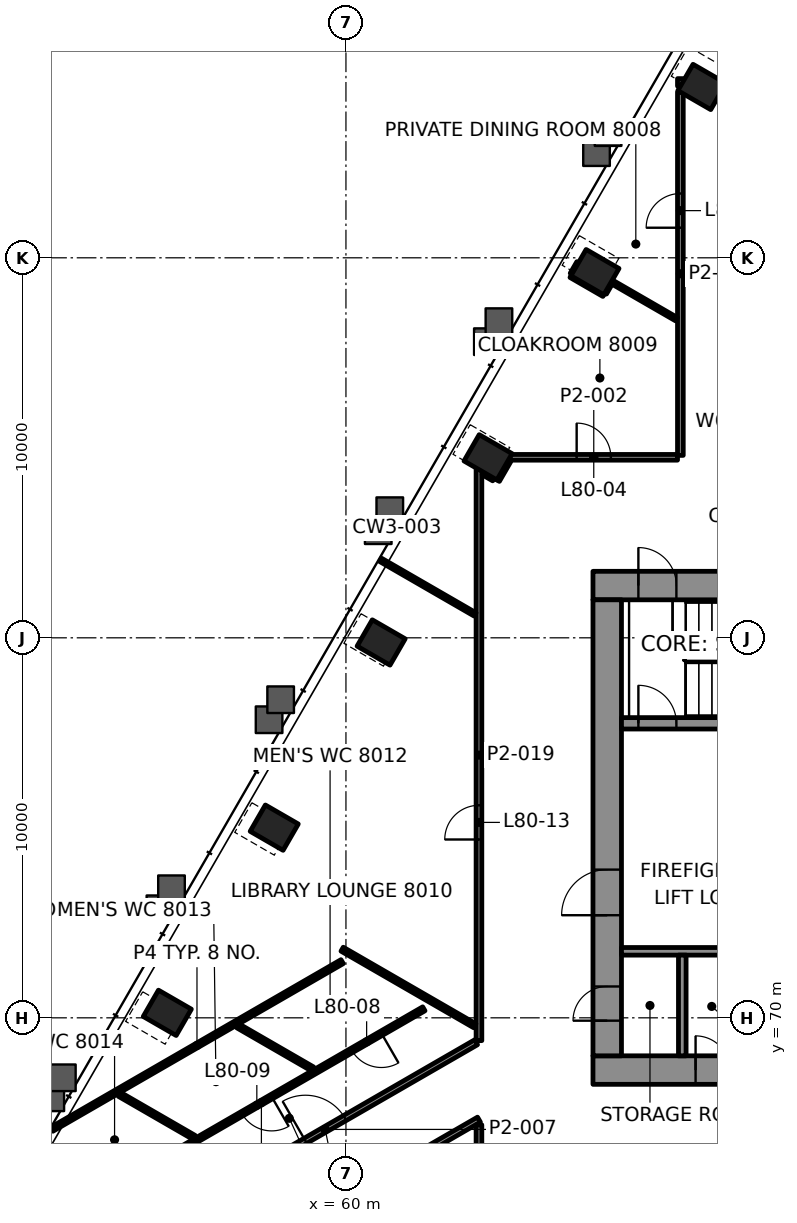
"""IFC4 building model, lengths in metres.
Left out: names, types, materials, properties, quantities, classifications, styles, units other than length and angle.
Written with IfcOpenShell. Run it as: python <this file> out.ifc"""

import sys

from ifc_helpers import new_model, si_unit, direction, frame, frame_2d, origin, origin_2d, place, context, subcontext, project, spatial, rectangle, hollow_rectangle, extrude, element, fill, save


model = new_model("IFC4")
c1 = context("Model", 3, precision=1e-05, world=origin(), true_north=direction((0.0, 1.0)))
c2 = subcontext(c1, "Body", "Model", "MODEL_VIEW")
j1 = project(units=[si_unit("LENGTHUNIT", "METRE"), si_unit("PLANEANGLEUNIT", "RADIAN")], contexts=[c1])
p1 = place(None, origin())
s1 = spatial("IfcSite", under=j1, at=p1, CompositionType="ELEMENT")
p2 = place(p1, origin())
s2 = spatial("IfcBuilding", under=s1, at=p2, CompositionType="ELEMENT")
p3 = place(p2, frame((0.0, 0.0, 326.6)))
s3 = spatial("IfcBuildingStorey", under=s2, at=p3, CompositionType="ELEMENT", Elevation=326.6)
for number, where, z_axis, x_axis in (
    (1, (69.366, 94.496, -0.0), (0.0, 0.0, 1.0), (-0.5, -0.866, 0.0)),
    (2, (66.553, 89.623, -0.0), (0.0, 0.0, 1.0), (-0.5, -0.866, 0.0)),
    (3, (63.74, 84.75, -0.0), (0.0, 0.0, 1.0), (-0.5, -0.866, 0.0)),
    (4, (60.926, 79.877, -0.0), (0.0, 0.0, 1.0), (-0.5, -0.866, 0.0)),
    (5, (58.113, 75.004, -0.0), (0.0, 0.0, 1.0), (-0.5, -0.866, 0.0)),
    (6, (55.299, 70.131, -0.0), (0.0, 0.0, 1.0), (-0.5, -0.866, 0.0)),
):
    element("IfcColumn", number, at=place(p3, frame(where, z_axis=z_axis, x_axis=x_axis)), inside=s3, PredefinedType="COLUMN", context=c2, shape_type="SweptSolid", body=[
        extrude(hollow_rectangle(XDim=0.8, YDim=1.0, WallThickness=0.05, at=origin_2d()), origin(), (0.0, 0.0, 1.0), 5.0),
    ])
p4 = place(p3, frame((66.5, 68.625, 0.0), z_axis=(0.0, 0.0, 1.0), x_axis=(1.0, 0.0, 0.0)))
e7 = element("IfcWall", 7, at=p4, inside=s3, PredefinedType="SHEAR", context=c2, shape_type="SweptSolid", body=[
    extrude(rectangle(XDim=17.0, YDim=0.75, at=frame_2d((8.5, 0.0))), origin(), (0.0, 0.0, 1.0), 4.7),
])
p5 = place(p4, frame((2.7, 0.0, 0.0)))
e8 = element("IfcOpeningElement", 8, at=p5, cuts=e7, PredefinedType="OPENING", context=c2, shape_type="SweptSolid", body=[
    extrude(rectangle(XDim=0.9, YDim=2.1, at=frame_2d((0.45, 1.05))), frame((0.0, 0.385, 0.0), z_axis=(0.0, -1.0, 0.0), x_axis=(1.0, 0.0, 0.0)), (0.0, 0.0, 1.0), 0.77),
])
p6 = place(p3, frame((66.5, 81.375, 0.0), z_axis=(0.0, 0.0, 1.0), x_axis=(1.0, 0.0, 0.0)))
e9 = element("IfcWall", 9, at=p6, inside=s3, PredefinedType="SHEAR", context=c2, shape_type="SweptSolid", body=[
    extrude(rectangle(XDim=17.0, YDim=0.75, at=frame_2d((8.5, 0.0))), origin(), (0.0, 0.0, 1.0), 4.7),
])
p7 = place(p6, frame((1.195, 0.0, 0.0)))
e10 = element("IfcOpeningElement", 10, at=p7, cuts=e9, PredefinedType="OPENING", context=c2, shape_type="SweptSolid", body=[
    extrude(rectangle(XDim=1.0, YDim=2.1, at=frame_2d((0.5, 1.05))), frame((0.0, 0.385, 0.0), z_axis=(0.0, -1.0, 0.0), x_axis=(1.0, 0.0, 0.0)), (0.0, 0.0, 1.0), 0.77),
])
p8 = place(p6, frame((15.005, 0.0, 0.0)))
e11 = element("IfcOpeningElement", 11, at=p8, cuts=e9, PredefinedType="OPENING", context=c2, shape_type="SweptSolid", body=[
    extrude(rectangle(XDim=1.0, YDim=2.1, at=frame_2d((0.5, 1.05))), frame((0.0, 0.385, 0.0), z_axis=(0.0, -1.0, 0.0), x_axis=(1.0, 0.0, 0.0)), (0.0, 0.0, 1.0), 0.77),
])
p9 = place(p6, frame((8.15, 0.0, 0.0)))
e12 = element("IfcOpeningElement", 12, at=p9, cuts=e9, PredefinedType="OPENING", context=c2, shape_type="SweptSolid", body=[
    extrude(rectangle(XDim=0.9, YDim=2.1, at=frame_2d((0.45, 1.05))), frame((0.0, 0.385, 0.0), z_axis=(0.0, -1.0, 0.0), x_axis=(1.0, 0.0, 0.0)), (0.0, 0.0, 1.0), 0.77),
])
p10 = place(p3, frame((66.875, 69.0, 0.0), z_axis=(0.0, 0.0, 1.0), x_axis=(0.0, 1.0, 0.0)))
e13 = element("IfcWall", 13, at=p10, inside=s3, PredefinedType="SHEAR", context=c2, shape_type="SweptSolid", body=[
    extrude(rectangle(XDim=12.0, YDim=0.75, at=frame_2d((6.0, 0.0))), origin(), (0.0, 0.0, 1.0), 4.7),
])
p11 = place(p10, frame((3.7, 0.0, 0.0)))
e14 = element("IfcOpeningElement", 14, at=p11, cuts=e13, PredefinedType="OPENING", context=c2, shape_type="SweptSolid", body=[
    extrude(rectangle(XDim=1.2, YDim=2.1, at=frame_2d((0.6, 1.05))), frame((0.0, 0.385, 0.0), z_axis=(0.0, -1.0, 0.0), x_axis=(1.0, 0.0, 0.0)), (0.0, 0.0, 1.0), 0.77),
])
p12 = place(p10, frame((0.925, 0.0, 0.0)))
e15 = element("IfcOpeningElement", 15, at=p12, cuts=e13, PredefinedType="OPENING", context=c2, shape_type="SweptSolid", body=[
    extrude(rectangle(XDim=0.9, YDim=2.1, at=frame_2d((0.45, 1.05))), frame((0.0, 0.385, 0.0), z_axis=(0.0, -1.0, 0.0), x_axis=(1.0, 0.0, 0.0)), (0.0, 0.0, 1.0), 0.77),
])
p13 = place(p3, frame((67.25, 77.75, 0.0), z_axis=(0.0, 0.0, 1.0), x_axis=(1.0, 0.0, 0.0)))
e16 = element("IfcWall", 16, at=p13, inside=s3, PredefinedType="SHEAR", context=c2, shape_type="SweptSolid", body=[
    extrude(rectangle(XDim=15.5, YDim=0.3, at=frame_2d((7.75, 0.0))), origin(), (0.0, 0.0, 1.0), 4.7),
])
p14 = place(p13, frame((0.445, 0.0, 0.0)))
e17 = element("IfcOpeningElement", 17, at=p14, cuts=e16, PredefinedType="OPENING", context=c2, shape_type="SweptSolid", body=[
    extrude(rectangle(XDim=1.0, YDim=2.1, at=frame_2d((0.5, 1.05))), frame((0.0, 0.16, 0.0), z_axis=(0.0, -1.0, 0.0), x_axis=(1.0, 0.0, 0.0)), (0.0, 0.0, 1.0), 0.32),
])
p15 = place(p3, frame((64.317, 84.75, 0.0), z_axis=(0.0, 0.0, 1.0), x_axis=(1.0, 0.0, 0.0)))
e18 = element("IfcWall", 18, at=p15, inside=s3, PredefinedType="PARTITIONING", context=c2, shape_type="SweptSolid", body=[
    extrude(rectangle(XDim=4.407, YDim=0.15, at=frame_2d((2.204, 0.0))), origin(), (0.0, 0.0, 1.0), 4.1),
])
p16 = place(p15, frame((1.754, 0.0, 0.0)))
e19 = element("IfcOpeningElement", 19, at=p16, cuts=e18, PredefinedType="OPENING", context=c2, shape_type="SweptSolid", body=[
    extrude(rectangle(XDim=0.9, YDim=2.1, at=frame_2d((0.45, 1.05))), frame((0.0, 0.085, 0.0), z_axis=(0.0, -1.0, 0.0), x_axis=(1.0, 0.0, 0.0)), (0.0, 0.0, 1.0), 0.17),
])
p17 = place(p3, frame((56.382, 63.212, 0.0), z_axis=(0.0, 0.0, 1.0), x_axis=(0.866028290602, 0.499994999852, 0.0)))
e20 = element("IfcWall", 20, at=p17, inside=s3, PredefinedType="PARTITIONING", context=c2, shape_type="SweptSolid", body=[
    extrude(rectangle(XDim=8.219, YDim=0.15, at=frame_2d((4.11, 0.0))), origin(), (0.0, 0.0, 1.0), 4.097),
])
p18 = place(p3, frame((55.481, 64.77, 0.0), z_axis=(0.0, 0.0, 1.0), x_axis=(0.866028235655, 0.499995095024, 0.0)))
e21 = element("IfcWall", 21, at=p18, inside=s3, PredefinedType="PARTITIONING", context=c2, shape_type="SweptSolid", body=[
    extrude(rectangle(XDim=9.172, YDim=0.15, at=frame_2d((4.586, 0.0))), origin(), (0.0, 0.0, 1.0), 4.1),
])
p19 = place(p18, frame((3.986, 0.0, 0.0)))
e22 = element("IfcOpeningElement", 22, at=p19, cuts=e21, PredefinedType="OPENING", context=c2, shape_type="SweptSolid", body=[
    extrude(rectangle(XDim=1.2, YDim=2.1, at=frame_2d((0.6, 1.05))), frame((0.0, 0.085, 0.0), z_axis=(0.0, -1.0, 0.0), x_axis=(1.0, 0.0, 0.0)), (0.0, 0.0, 1.0), 0.17),
])
p20 = place(p3, frame((62.05, 70.237, 0.0), z_axis=(0.0, 0.0, 1.0), x_axis=(-0.866021674193, -0.500006459787, 0.0)))
e23 = element("IfcWall", 23, at=p20, inside=s3, PredefinedType="PARTITIONING", context=c2, shape_type="SweptSolid", body=[
    extrude(rectangle(XDim=9.872, YDim=0.12, at=frame_2d((4.936, 0.0))), origin(), (0.0, 0.0, 1.0), 4.1),
])
p21 = place(p20, frame((1.289, 0.0, 0.0)))
e24 = element("IfcOpeningElement", 24, at=p21, cuts=e23, PredefinedType="OPENING", context=c2, shape_type="SweptSolid", body=[
    extrude(rectangle(XDim=0.9, YDim=2.1, at=frame_2d((0.45, 1.05))), frame((0.0, 0.07, 0.0), z_axis=(0.0, -1.0, 0.0), x_axis=(1.0, 0.0, 0.0)), (0.0, 0.0, 1.0), 0.14),
])
p22 = place(p20, frame((4.625, 0.0, 0.0)))
e25 = element("IfcOpeningElement", 25, at=p22, cuts=e23, PredefinedType="OPENING", context=c2, shape_type="SweptSolid", body=[
    extrude(rectangle(XDim=0.9, YDim=2.1, at=frame_2d((0.45, 1.05))), frame((0.0, 0.07, 0.0), z_axis=(0.0, -1.0, 0.0), x_axis=(1.0, 0.0, 0.0)), (0.0, 0.0, 1.0), 0.14),
])
p23 = place(p20, frame((7.772, 0.0, 0.0)))
e26 = element("IfcOpeningElement", 26, at=p23, cuts=e23, PredefinedType="OPENING", context=c2, shape_type="SweptSolid", body=[
    extrude(rectangle(XDim=1.0, YDim=2.1, at=frame_2d((0.5, 1.05))), frame((0.0, 0.07, 0.0), z_axis=(0.0, -1.0, 0.0), x_axis=(1.0, 0.0, 0.0)), (0.0, 0.0, 1.0), 0.14),
])
p24 = place(p3, frame((52.26, 67.068, 0.0), z_axis=(0.0, 0.0, 1.0), x_axis=(0.866030732089, 0.499990770993, 0.0)))
e27 = element("IfcWall", 27, at=p24, inside=s3, PredefinedType="PARTITIONING", context=c2, shape_type="SweptSolid", body=[
    extrude(rectangle(XDim=8.822, YDim=0.12, at=frame_2d((4.411, 0.0))), origin(), (0.0, 0.0, 1.0), 4.1),
])
p25 = place(p3, frame((63.973, 84.154, 0.0), z_axis=(0.0, 0.0, 1.0), x_axis=(0.499980071345, 0.866036909293, 0.0)))
e28 = element("IfcWall", 28, at=p25, inside=s3, PredefinedType="PARTITIONING", context=c2, shape_type="SweptSolid", body=[
    extrude(rectangle(XDim=0.602, YDim=0.15, at=frame_2d((0.301, 0.0))), origin(), (0.0, 0.0, 1.0), 4.1),
])
p26 = place(p3, frame((66.811, 89.07, 0.0), z_axis=(0.0, 0.0, 1.0), x_axis=(0.499910707084, 0.866076950936, 0.0)))
e29 = element("IfcWall", 29, at=p26, inside=s3, PredefinedType="PARTITIONING", context=c2, shape_type="SweptSolid", body=[
    extrude(rectangle(XDim=0.299, YDim=0.1, at=frame_2d((0.15, 0.0))), origin(), (0.0, 0.0, 1.0), 4.1),
])
p27 = place(p3, frame((65.945, 89.57, 0.0), z_axis=(0.0, 0.0, 1.0), x_axis=(0.499520837356, 0.866301871779, 0.0)))
e30 = element("IfcWall", 30, at=p27, inside=s3, PredefinedType="PARTITIONING", context=c2, shape_type="SweptSolid", body=[
    extrude(rectangle(XDim=0.349, YDim=0.1, at=frame_2d((0.175, 0.0))), origin(), (0.0, 0.0, 1.0), 4.1),
])
p28 = place(p3, frame((68.8, 84.801, 0.0), z_axis=(0.0, 0.0, 1.0), x_axis=(0.0, 1.0, 0.0)))
e31 = element("IfcWall", 31, at=p28, inside=s3, PredefinedType="PARTITIONING", context=c2, shape_type="SweptSolid", body=[
    extrude(rectangle(XDim=9.56, YDim=0.15, at=frame_2d((4.78, 0.0))), origin(), (0.0, 0.0, 1.0), 4.088),
])
p29 = place(p28, frame((5.991, 0.0, 0.0)))
e32 = element("IfcOpeningElement", 32, at=p29, cuts=e31, PredefinedType="OPENING", context=c2, shape_type="SweptSolid", body=[
    extrude(rectangle(XDim=0.9, YDim=2.1, at=frame_2d((0.45, 1.05))), frame((0.0, 0.085, 0.0), z_axis=(0.0, -1.0, 0.0), x_axis=(1.0, 0.0, 0.0)), (0.0, 0.0, 1.0), 0.17),
])
p30 = place(p3, frame((68.8, 94.517, 0.0), z_axis=(0.0, 0.0, 1.0), x_axis=(0.0, 1.0, 0.0)))
e33 = element("IfcWall", 33, at=p30, inside=s3, PredefinedType="PARTITIONING", context=c2, shape_type="SweptSolid", body=[
    extrude(rectangle(XDim=0.198, YDim=0.15, at=frame_2d((0.099, 0.0))), origin(), (0.0, 0.0, 1.0), 4.1),
])
p31 = place(p3, frame((63.5, 65.325, 0.0), z_axis=(0.0, 0.0, 1.0), x_axis=(0.0, 1.0, 0.0)))
e34 = element("IfcWall", 34, at=p31, inside=s3, PredefinedType="PARTITIONING", context=c2, shape_type="SweptSolid", body=[
    extrude(rectangle(XDim=1.859, YDim=0.15, at=frame_2d((0.93, 0.0))), origin(), (0.0, 0.0, 1.0), 4.097),
])
p32 = place(p3, frame((63.5, 69.4, 0.0), z_axis=(0.0, 0.0, 1.0), x_axis=(0.0, 1.0, 0.0)))
e35 = element("IfcWall", 35, at=p32, inside=s3, PredefinedType="PARTITIONING", context=c2, shape_type="SweptSolid", body=[
    extrude(rectangle(XDim=15.026, YDim=0.15, at=frame_2d((7.513, 0.0))), origin(), (0.0, 0.0, 1.0), 4.088),
])
p33 = place(p32, frame((5.293, 0.0, 0.0)))
e36 = element("IfcOpeningElement", 36, at=p33, cuts=e35, PredefinedType="OPENING", context=c2, shape_type="SweptSolid", body=[
    extrude(rectangle(XDim=0.9, YDim=2.1, at=frame_2d((0.45, 1.05))), frame((0.0, 0.085, 0.0), z_axis=(0.0, -1.0, 0.0), x_axis=(1.0, 0.0, 0.0)), (0.0, 0.0, 1.0), 0.17),
])
p34 = place(p3, frame((68.699, 88.384, 0.0), z_axis=(0.0, 0.0, 1.0), x_axis=(-0.865986221566, 0.500067859453, 0.0)))
e37 = element("IfcWall", 37, at=p34, inside=s3, PredefinedType="PARTITIONING", context=c2, shape_type="SweptSolid", body=[
    extrude(rectangle(XDim=1.978, YDim=0.1, at=frame_2d((0.989, 0.0))), origin(), (0.0, 0.0, 1.0), 4.1),
])
p35 = place(p3, frame((66.785, 89.027, 0.0), z_axis=(0.0, 0.0, 1.0), x_axis=(-0.866039090965, 0.499976292358, 0.0)))
e38 = element("IfcWall", 38, at=p35, inside=s3, PredefinedType="PARTITIONING", context=c2, shape_type="SweptSolid", body=[
    extrude(rectangle(XDim=0.999, YDim=0.1, at=frame_2d((0.5, 0.0))), origin(), (0.0, 0.0, 1.0), 4.088),
])
p36 = place(p3, frame((63.899, 84.196, 0.0), z_axis=(0.0, 0.0, 1.0), x_axis=(-0.866235917577, 0.499635202023, 0.0)))
e39 = element("IfcWall", 39, at=p36, inside=s3, PredefinedType="PARTITIONING", context=c2, shape_type="SweptSolid", body=[
    extrude(rectangle(XDim=0.323, YDim=0.15, at=frame_2d((0.162, 0.0))), origin(), (0.0, 0.0, 1.0), 4.088),
])
p37 = place(p3, frame((63.399, 80.615, 0.0), z_axis=(0.0, 0.0, 1.0), x_axis=(-0.866032736054, 0.499987299922, 0.0)))
e40 = element("IfcWall", 40, at=p37, inside=s3, PredefinedType="PARTITIONING", context=c2, shape_type="SweptSolid", body=[
    extrude(rectangle(XDim=2.873, YDim=0.1, at=frame_2d((1.436, 0.0))), origin(), (0.0, 0.0, 1.0), 4.088),
])
p38 = place(p3, frame((63.39, 69.791, 0.0), z_axis=(0.0, 0.0, 1.0), x_axis=(-0.866020143075, 0.500009111705, 0.0)))
e41 = element("IfcWall", 41, at=p38, inside=s3, PredefinedType="PARTITIONING", context=c2, shape_type="SweptSolid", body=[
    extrude(rectangle(XDim=4.03, YDim=0.12, at=frame_2d((2.015, 0.0))), origin(), (0.0, 0.0, 1.0), 4.1),
])
p39 = place(p3, frame((59.12, 68.655, 0.0), z_axis=(0.0, 0.0, 1.0), x_axis=(-0.866011396007, 0.500024261398, 0.0)))
e42 = element("IfcWall", 42, at=p39, inside=s3, PredefinedType="PARTITIONING", context=c2, shape_type="SweptSolid", body=[
    extrude(rectangle(XDim=2.264, YDim=0.12, at=frame_2d((1.132, 0.0))), origin(), (0.0, 0.0, 1.0), 4.1),
])
p40 = place(p3, frame((56.001, 66.854, 0.0), z_axis=(0.0, 0.0, 1.0), x_axis=(-0.866058089564, 0.499943382296, 0.0)))
e43 = element("IfcWall", 43, at=p40, inside=s3, PredefinedType="PARTITIONING", context=c2, shape_type="SweptSolid", body=[
    extrude(rectangle(XDim=2.264, YDim=0.12, at=frame_2d((1.132, 0.0))), origin(), (0.0, 0.0, 1.0), 4.1),
])
p41 = place(p3, frame((67.25, 71.75, 0.0), z_axis=(0.0, 0.0, 1.0), x_axis=(1.0, 0.0, 0.0)))
e44 = element("IfcWall", 44, at=p41, inside=s3, PredefinedType="PARTITIONING", context=c2, shape_type="SweptSolid", body=[
    extrude(rectangle(XDim=3.05, YDim=0.2, at=frame_2d((1.525, 0.0))), origin(), (0.0, 0.0, 1.0), 4.7),
])
p42 = place(p3, frame((68.85, 69.0, 0.0), z_axis=(0.0, 0.0, 1.0), x_axis=(0.0, 1.0, 0.0)))
e45 = element("IfcWall", 45, at=p42, inside=s3, PredefinedType="PARTITIONING", context=c2, shape_type="SweptSolid", body=[
    extrude(rectangle(XDim=2.65, YDim=0.2, at=frame_2d((1.325, 0.0))), origin(), (0.0, 0.0, 1.0), 4.7),
])
p43 = place(p16, origin())
e46 = element("IfcDoor", 46, at=p43, inside=s3, OperationType="SINGLE_SWING_RIGHT", PredefinedType="DOOR", context=c2, shape_type="SweptSolid", body=[
    extrude(rectangle(XDim=0.9, YDim=2.1, at=frame_2d((0.45, 1.05))), frame((0.0, 0.025, 0.0), z_axis=(0.0, -1.0, 0.0), x_axis=(1.0, 0.0, 0.0)), (0.0, 0.0, 1.0), 0.05),
])
fill(e19, e46)
p44 = place(p19, origin())
e47 = element("IfcDoor", 47, at=p44, inside=s3, OperationType="DOUBLE_DOOR_SINGLE_SWING", PredefinedType="DOOR", context=c2, shape_type="SweptSolid", body=[
    extrude(rectangle(XDim=1.2, YDim=2.1, at=frame_2d((0.6, 1.05))), frame((0.0, 0.025, 0.0), z_axis=(0.0, -1.0, 0.0), x_axis=(1.0, 0.0, 0.0)), (0.0, 0.0, 1.0), 0.05),
])
fill(e22, e47)
p45 = place(p21, origin())
e48 = element("IfcDoor", 48, at=p45, inside=s3, OperationType="SINGLE_SWING_RIGHT", PredefinedType="DOOR", context=c2, shape_type="SweptSolid", body=[
    extrude(rectangle(XDim=0.9, YDim=2.1, at=frame_2d((0.45, 1.05))), frame((0.0, 0.025, 0.0), z_axis=(0.0, -1.0, 0.0), x_axis=(1.0, 0.0, 0.0)), (0.0, 0.0, 1.0), 0.05),
])
fill(e24, e48)
p46 = place(p22, origin())
e49 = element("IfcDoor", 49, at=p46, inside=s3, OperationType="SINGLE_SWING_LEFT", PredefinedType="DOOR", context=c2, shape_type="SweptSolid", body=[
    extrude(rectangle(XDim=0.9, YDim=2.1, at=frame_2d((0.45, 1.05))), frame((0.0, 0.025, 0.0), z_axis=(0.0, -1.0, 0.0), x_axis=(1.0, 0.0, 0.0)), (0.0, 0.0, 1.0), 0.05),
])
fill(e25, e49)
p47 = place(p29, origin())
e50 = element("IfcDoor", 50, at=p47, inside=s3, OperationType="SINGLE_SWING_LEFT", PredefinedType="DOOR", context=c2, shape_type="SweptSolid", body=[
    extrude(rectangle(XDim=0.9, YDim=2.1, at=frame_2d((0.45, 1.05))), frame((0.0, 0.025, 0.0), z_axis=(0.0, -1.0, 0.0), x_axis=(1.0, 0.0, 0.0)), (0.0, 0.0, 1.0), 0.05),
])
fill(e32, e50)
p48 = place(p33, origin())
e51 = element("IfcDoor", 51, at=p48, inside=s3, OperationType="SINGLE_SWING_LEFT", PredefinedType="DOOR", context=c2, shape_type="SweptSolid", body=[
    extrude(rectangle(XDim=0.9, YDim=2.1, at=frame_2d((0.45, 1.05))), frame((0.0, 0.025, 0.0), z_axis=(0.0, -1.0, 0.0), x_axis=(1.0, 0.0, 0.0)), (0.0, 0.0, 1.0), 0.05),
])
fill(e36, e51)
p49 = place(p14, origin())
e52 = element("IfcDoor", 52, at=p49, inside=s3, OperationType="SINGLE_SWING_LEFT", PredefinedType="DOOR", context=c2, shape_type="SweptSolid", body=[
    extrude(rectangle(XDim=1.0, YDim=2.1, at=frame_2d((0.5, 1.05))), frame((0.0, 0.025, 0.0), z_axis=(0.0, -1.0, 0.0), x_axis=(1.0, 0.0, 0.0)), (0.0, 0.0, 1.0), 0.05),
])
fill(e17, e52)
p50 = place(p7, origin())
e53 = element("IfcDoor", 53, at=p50, inside=s3, OperationType="SINGLE_SWING_RIGHT", PredefinedType="DOOR", context=c2, shape_type="SweptSolid", body=[
    extrude(rectangle(XDim=1.0, YDim=2.1, at=frame_2d((0.5, 1.05))), frame((0.0, 0.095, 0.0), z_axis=(0.0, -1.0, 0.0), x_axis=(1.0, 0.0, 0.0)), (0.0, 0.0, 1.0), 0.19),
])
fill(e10, e53)
p51 = place(p11, origin())
e54 = element("IfcDoor", 54, at=p51, inside=s3, OperationType="SINGLE_SWING_RIGHT", PredefinedType="DOOR", context=c2, shape_type="SweptSolid", body=[
    extrude(rectangle(XDim=1.2, YDim=2.1, at=frame_2d((0.6, 1.05))), frame((0.0, 0.095, 0.0), z_axis=(0.0, -1.0, 0.0), x_axis=(1.0, 0.0, 0.0)), (0.0, 0.0, 1.0), 0.19),
])
fill(e14, e54)
p52 = place(p12, origin())
e55 = element("IfcDoor", 55, at=p52, inside=s3, OperationType="SINGLE_SWING_RIGHT", PredefinedType="DOOR", context=c2, shape_type="SweptSolid", body=[
    extrude(rectangle(XDim=0.9, YDim=2.1, at=frame_2d((0.45, 1.05))), frame((0.0, 0.095, 0.0), z_axis=(0.0, -1.0, 0.0), x_axis=(1.0, 0.0, 0.0)), (0.0, 0.0, 1.0), 0.19),
])
fill(e15, e55)
p53 = place(p5, origin())
e56 = element("IfcDoor", 56, at=p53, inside=s3, OperationType="SINGLE_SWING_LEFT", PredefinedType="DOOR", context=c2, shape_type="SweptSolid", body=[
    extrude(rectangle(XDim=0.9, YDim=2.1, at=frame_2d((0.45, 1.05))), frame((0.0, 0.095, 0.0), z_axis=(0.0, -1.0, 0.0), x_axis=(1.0, 0.0, 0.0)), (0.0, 0.0, 1.0), 0.19),
])
fill(e8, e56)
save(model, sys.argv[1])
